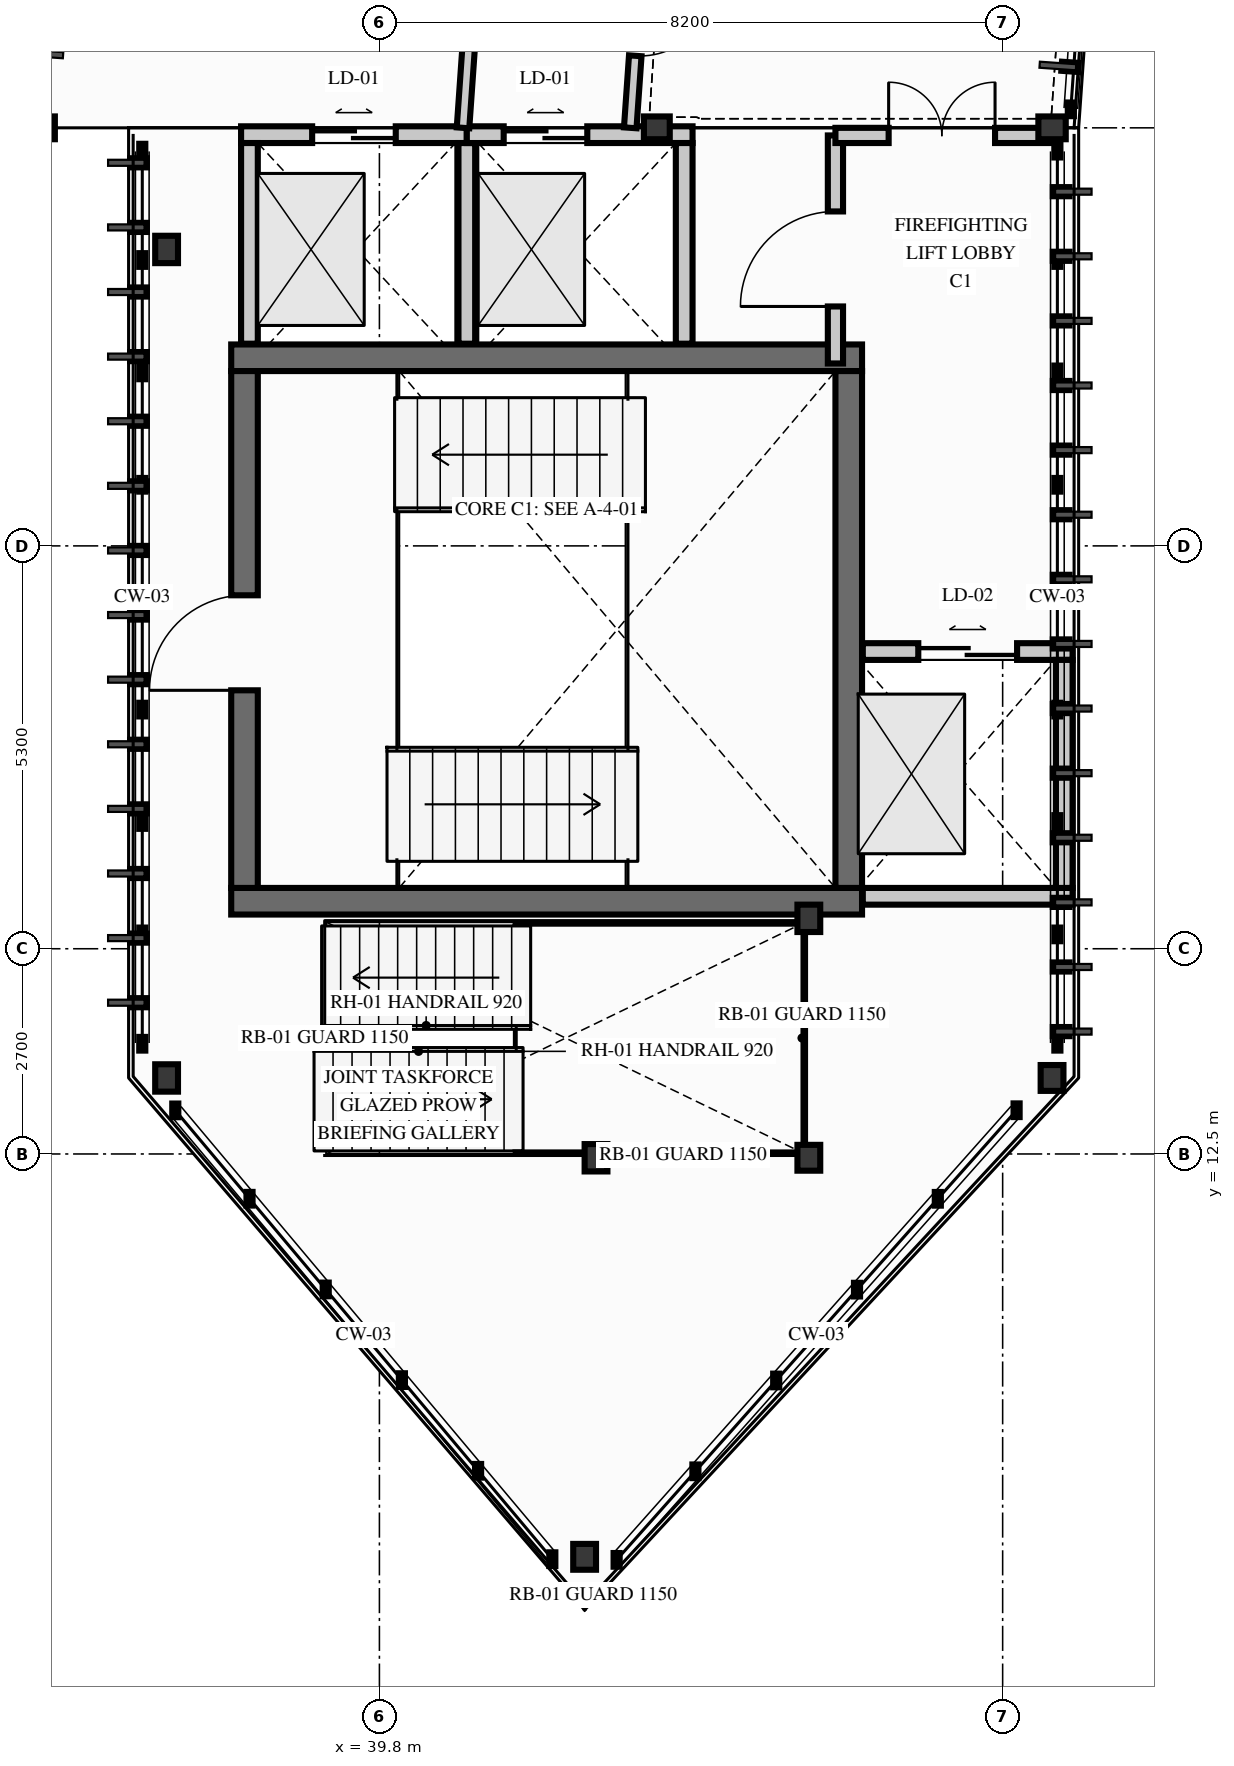
"""IFC4 building model, lengths in metres.
Left out: names, types, materials, properties, quantities, classifications, styles, units other than length and angle.
Written with IfcOpenShell. Run it as: python <this file> out.ifc"""

import sys

from ifc_helpers import new_model, si_unit, direction, frame, frame_2d, origin, origin_2d, place, context, subcontext, project, spatial, rectangle, i_section, extrude, element, fill, save


model = new_model("IFC4")
c1 = context("Model", 3, precision=1e-05, world=origin(), true_north=direction((0.0, 1.0)))
c2 = subcontext(c1, "Body", "Model", "MODEL_VIEW")
j1 = project(units=[si_unit("LENGTHUNIT", "METRE"), si_unit("PLANEANGLEUNIT", "RADIAN")], contexts=[c1])
p1 = place(None, origin())
s1 = spatial("IfcSite", under=j1, at=p1, CompositionType="ELEMENT")
p2 = place(p1, origin())
s2 = spatial("IfcBuilding", under=s1, at=p2, CompositionType="ELEMENT")
p3 = place(p2, frame((0.0, 0.0, 17.7)))
s3 = spatial("IfcBuildingStorey", under=s2, at=p3, CompositionType="ELEMENT", Elevation=17.7)
for number, where, z_axis, x_axis in (
    (1, (37.85, 15.825, 0.0), (0.0, 0.0, 1.0), (1.0, 0.0, 0.0)),
    (2, (37.85, 22.975, 0.0), (0.0, 0.0, 1.0), (1.0, 0.0, 0.0)),
):
    element("IfcWall", number, at=place(p3, frame(where, z_axis=z_axis, x_axis=x_axis)), inside=s3, PredefinedType="SHEAR", context=c2, shape_type="SweptSolid", body=[
        extrude(rectangle(XDim=8.3, YDim=0.35, at=frame_2d((4.15, 0.0))), origin(), (0.0, 0.0, 1.0), 3.7),
    ])
p4 = place(p3, frame((38.025, 16.0, 0.0), z_axis=(0.0, 0.0, 1.0), x_axis=(0.0, 1.0, 0.0)))
e3 = element("IfcWall", 3, at=p4, inside=s3, PredefinedType="SHEAR", context=c2, shape_type="SweptSolid", body=[
    extrude(rectangle(XDim=6.8, YDim=0.35, at=frame_2d((3.4, 0.0))), origin(), (0.0, 0.0, 1.0), 3.7),
])
p5 = place(p4, frame((2.6, 0.0, 0.0)))
e4 = element("IfcOpeningElement", 4, at=p5, cuts=e3, PredefinedType="OPENING", context=c2, shape_type="SweptSolid", body=[
    extrude(rectangle(XDim=1.25, YDim=2.2, at=frame_2d((0.625, 1.1))), frame((0.0, 0.185, 0.0), z_axis=(0.0, -1.0, 0.0), x_axis=(1.0, 0.0, 0.0)), (0.0, 0.0, 1.0), 0.37),
])
p6 = place(p3, frame((45.975, 16.0, 0.0), z_axis=(0.0, 0.0, 1.0), x_axis=(0.0, 1.0, 0.0)))
e5 = element("IfcWall", 5, at=p6, inside=s3, PredefinedType="SHEAR", context=c2, shape_type="SweptSolid", body=[
    extrude(rectangle(XDim=6.8, YDim=0.35, at=frame_2d((3.4, 0.0))), origin(), (0.0, 0.0, 1.0), 3.7),
])
p7 = place(p3, frame((48.65, 26.0, 0.0), z_axis=(0.0, 0.0, 1.0), x_axis=(0.0, 1.0, 0.0)))
e6 = element("IfcColumn", 6, at=p7, inside=s3, PredefinedType="COLUMN", context=c2, shape_type="SweptSolid", body=[
    extrude(i_section(OverallWidth=0.3, OverallDepth=0.36, WebThickness=0.012, FlangeThickness=0.022, FilletRadius=0.027, at=origin_2d()), origin(), (0.0, 0.0, 1.0), 3.9),
])
p8 = place(p3, frame((43.45, 26.0, 0.0), z_axis=(0.0, 0.0, 1.0), x_axis=(0.0, 1.0, 0.0)))
e7 = element("IfcColumn", 7, at=p8, inside=s3, PredefinedType="COLUMN", context=c2, shape_type="SweptSolid", body=[
    extrude(i_section(OverallWidth=0.3, OverallDepth=0.34, WebThickness=0.012, FlangeThickness=0.021, FilletRadius=0.027, at=origin_2d()), origin(), (0.0, 0.0, 1.0), 3.9),
])
for number, where, z_axis, x_axis in (
    (8, (35.35, 26.0, 0.0), (0.0, 0.0, 1.0), (0.0, 1.0, 0.0)),
    (9, (37.0, 24.4, 0.0), (0.0, 0.0, 1.0), (1.0, 0.0, 0.0)),
):
    element("IfcColumn", number, at=place(p3, frame(where, z_axis=z_axis, x_axis=x_axis)), inside=s3, PredefinedType="COLUMN", context=c2, shape_type="SweptSolid", body=[
        extrude(i_section(OverallWidth=0.3, OverallDepth=0.36, WebThickness=0.012, FlangeThickness=0.022, FilletRadius=0.027, at=origin_2d()), origin(), (0.0, 0.0, 1.0), 3.9),
    ])
p9 = place(p3, frame((48.65, 13.5, 0.0), z_axis=(0.0, 0.0, 1.0), x_axis=(1.0, 0.0, 0.0)))
e10 = element("IfcColumn", 10, at=p9, inside=s3, PredefinedType="COLUMN", context=c2, shape_type="SweptSolid", body=[
    extrude(i_section(OverallWidth=0.3, OverallDepth=0.34, WebThickness=0.012, FlangeThickness=0.021, FilletRadius=0.027, at=origin_2d()), origin(), (0.0, 0.0, 1.0), 3.9),
])
p10 = place(p3, frame((37.0, 13.5, 0.0), z_axis=(0.0, 0.0, 1.0), x_axis=(1.0, 0.0, 0.0)))
e11 = element("IfcColumn", 11, at=p10, inside=s3, PredefinedType="COLUMN", context=c2, shape_type="SweptSolid", body=[
    extrude(i_section(OverallWidth=0.3, OverallDepth=0.36, WebThickness=0.012, FlangeThickness=0.022, FilletRadius=0.027, at=origin_2d()), origin(), (0.0, 0.0, 1.0), 3.9),
])
p11 = place(p3, frame((42.5, 7.2, 0.0), z_axis=(0.0, 0.0, 1.0), x_axis=(1.0, 0.0, 0.0)))
e12 = element("IfcColumn", 12, at=p11, inside=s3, PredefinedType="COLUMN", context=c2, shape_type="SweptSolid", body=[
    extrude(i_section(OverallWidth=0.3, OverallDepth=0.34, WebThickness=0.012, FlangeThickness=0.021, FilletRadius=0.027, at=origin_2d()), origin(), (0.0, 0.0, 1.0), 3.9),
])
p12 = place(p3, frame((42.65, 12.45, 0.0), z_axis=(0.0, 0.0, 1.0), x_axis=(1.0, 0.0, 0.0)))
e13 = element("IfcColumn", 13, at=p12, inside=s3, PredefinedType="COLUMN", context=c2, shape_type="SweptSolid", body=[
    extrude(i_section(OverallWidth=0.3, OverallDepth=0.36, WebThickness=0.012, FlangeThickness=0.022, FilletRadius=0.027, at=origin_2d()), origin(), (0.0, 0.0, 1.0), 3.9),
])
p13 = place(p3, frame((45.45, 12.45, 0.0), z_axis=(0.0, 0.0, 1.0), x_axis=(1.0, 0.0, 0.0)))
e14 = element("IfcColumn", 14, at=p13, inside=s3, PredefinedType="COLUMN", context=c2, shape_type="SweptSolid", body=[
    extrude(i_section(OverallWidth=0.3, OverallDepth=0.34, WebThickness=0.012, FlangeThickness=0.021, FilletRadius=0.027, at=origin_2d()), origin(), (0.0, 0.0, 1.0), 3.9),
])
p14 = place(p3, frame((45.45, 15.6, 0.0), z_axis=(0.0, 0.0, 1.0), x_axis=(1.0, 0.0, 0.0)))
e15 = element("IfcColumn", 15, at=p14, inside=s3, PredefinedType="COLUMN", context=c2, shape_type="SweptSolid", body=[
    extrude(i_section(OverallWidth=0.3, OverallDepth=0.36, WebThickness=0.012, FlangeThickness=0.022, FilletRadius=0.027, at=origin_2d()), origin(), (0.0, 0.0, 1.0), 3.9),
])
p15 = place(p3, frame((46.16, 15.89, 0.0), z_axis=(0.0, 0.0, 1.0), x_axis=(1.0, 0.0, 0.0)))
e16 = element("IfcWall", 16, at=p15, inside=s3, PredefinedType="PARTITIONING", context=c2, shape_type="SweptSolid", body=[
    extrude(rectangle(XDim=2.76, YDim=0.22, at=frame_2d((1.38, 0.0))), origin(), (0.0, 0.0, 1.0), 3.338),
])
p16 = place(p3, frame((46.16, 19.11, 0.0), z_axis=(0.0, 0.0, 1.0), x_axis=(1.0, 0.0, 0.0)))
e17 = element("IfcWall", 17, at=p16, inside=s3, PredefinedType="PARTITIONING", context=c2, shape_type="SweptSolid", body=[
    extrude(rectangle(XDim=2.76, YDim=0.22, at=frame_2d((1.38, 0.0))), origin(), (0.0, 0.0, 1.0), 3.338),
])
p17 = place(p16, frame((0.73, 0.0, 0.0)))
e18 = element("IfcOpeningElement", 18, at=p17, cuts=e17, PredefinedType="OPENING", context=c2, shape_type="SweptSolid", body=[
    extrude(rectangle(XDim=1.3, YDim=2.2, at=frame_2d((0.65, 1.1))), frame((0.0, 0.12, 0.0), z_axis=(0.0, -1.0, 0.0), x_axis=(1.0, 0.0, 0.0)), (0.0, 0.0, 1.0), 0.24),
])
p18 = place(p3, frame((48.81, 16.0, 0.0), z_axis=(0.0, 0.0, 1.0), x_axis=(0.0, 1.0, 0.0)))
e19 = element("IfcWall", 19, at=p18, inside=s3, PredefinedType="PARTITIONING", context=c2, shape_type="SweptSolid", body=[
    extrude(rectangle(XDim=3.0, YDim=0.22, at=frame_2d((1.5, 0.0))), origin(), (0.0, 0.0, 1.0), 3.34),
])
p19 = place(p3, frame((37.98, 25.91, 0.0), z_axis=(0.0, 0.0, 1.0), x_axis=(1.0, 0.0, 0.0)))
e20 = element("IfcWall", 20, at=p19, inside=s3, PredefinedType="PARTITIONING", context=c2, shape_type="SweptSolid", body=[
    extrude(rectangle(XDim=2.97, YDim=0.22, at=frame_2d((1.485, 0.0))), origin(), (0.0, 0.0, 1.0), 3.25),
])
p20 = place(p19, frame((0.935, 0.0, 0.0)))
e21 = element("IfcOpeningElement", 21, at=p20, cuts=e20, PredefinedType="OPENING", context=c2, shape_type="SweptSolid", body=[
    extrude(rectangle(XDim=1.1, YDim=2.15, at=frame_2d((0.55, 1.075))), frame((0.0, 0.12, 0.0), z_axis=(0.0, -1.0, 0.0), x_axis=(1.0, 0.0, 0.0)), (0.0, 0.0, 1.0), 0.24),
])
for number, where, z_axis, x_axis in (
    (22, (38.09, 23.16, 0.0), (0.0, 0.0, 1.0), (0.0, 1.0, 0.0)),
    (23, (40.95, 23.16, 0.0), (0.0, 0.0, 1.0), (0.0, 1.0, 0.0)),
):
    element("IfcWall", number, at=place(p3, frame(where, z_axis=z_axis, x_axis=x_axis)), inside=s3, PredefinedType="PARTITIONING", context=c2, shape_type="SweptSolid", body=[
        extrude(rectangle(XDim=2.64, YDim=0.22, at=frame_2d((1.32, 0.0))), origin(), (0.0, 0.0, 1.0), 3.68),
    ])
p21 = place(p3, frame((40.95, 25.91, 0.0), z_axis=(0.0, 0.0, 1.0), x_axis=(1.0, 0.0, 0.0)))
e24 = element("IfcWall", 24, at=p21, inside=s3, PredefinedType="PARTITIONING", context=c2, shape_type="SweptSolid", body=[
    extrude(rectangle(XDim=2.97, YDim=0.22, at=frame_2d((1.485, 0.0))), origin(), (0.0, 0.0, 1.0), 3.25),
])
p22 = place(p21, frame((0.485, 0.0, 0.0)))
e25 = element("IfcOpeningElement", 25, at=p22, cuts=e24, PredefinedType="OPENING", context=c2, shape_type="SweptSolid", body=[
    extrude(rectangle(XDim=1.1, YDim=2.15, at=frame_2d((0.55, 1.075))), frame((0.0, 0.12, 0.0), z_axis=(0.0, -1.0, 0.0), x_axis=(1.0, 0.0, 0.0)), (0.0, 0.0, 1.0), 0.24),
])
p23 = place(p3, frame((43.81, 23.16, 0.0), z_axis=(0.0, 0.0, 1.0), x_axis=(0.0, 1.0, 0.0)))
e26 = element("IfcWall", 26, at=p23, inside=s3, PredefinedType="PARTITIONING", context=c2, shape_type="SweptSolid", body=[
    extrude(rectangle(XDim=2.64, YDim=0.22, at=frame_2d((1.32, 0.0))), origin(), (0.0, 0.0, 1.0), 3.68),
])
p24 = place(p3, frame((45.8, 22.9, 0.0), z_axis=(0.0, 0.0, 1.0), x_axis=(0.0, 1.0, 0.0)))
e27 = element("IfcWall", 27, at=p24, inside=s3, PredefinedType="PARTITIONING", context=c2, shape_type="SweptSolid", body=[
    extrude(rectangle(XDim=3.0, YDim=0.2, at=frame_2d((1.5, 0.0))), origin(), (0.0, 0.0, 1.0), 3.68),
])
p25 = place(p24, frame((0.75, 0.0, 0.0)))
e28 = element("IfcOpeningElement", 28, at=p25, cuts=e27, PredefinedType="OPENING", context=c2, shape_type="SweptSolid", body=[
    extrude(rectangle(XDim=1.25, YDim=2.2, at=frame_2d((0.625, 1.1))), frame((0.0, 0.11, 0.0), z_axis=(0.0, -1.0, 0.0), x_axis=(1.0, 0.0, 0.0)), (0.0, 0.0, 1.0), 0.22),
])
p26 = place(p3, frame((45.8, 25.9, 0.0), z_axis=(0.0, 0.0, 1.0), x_axis=(1.0, 0.0, 0.0)))
e29 = element("IfcWall", 29, at=p26, inside=s3, PredefinedType="PARTITIONING", context=c2, shape_type="SweptSolid", body=[
    extrude(rectangle(XDim=2.85, YDim=0.2, at=frame_2d((1.425, 0.0))), origin(), (0.0, 0.0, 1.0), 3.3),
])
p27 = place(p26, frame((0.7, 0.0, 0.0)))
e30 = element("IfcOpeningElement", 30, at=p27, cuts=e29, PredefinedType="OPENING", context=c2, shape_type="SweptSolid", body=[
    extrude(rectangle(XDim=1.4, YDim=2.25, at=frame_2d((0.7, 1.125))), frame((0.0, 0.11, 0.0), z_axis=(0.0, -1.0, 0.0), x_axis=(1.0, 0.0, 0.0)), (0.0, 0.0, 1.0), 0.22),
])
p28 = place(p3, frame((43.595, 33.084, 0.0), z_axis=(0.0, 0.0, 1.0), x_axis=(-0.069756597752, -0.997564041588, 0.0)))
e31 = element("IfcWall", 31, at=p28, inside=s3, PredefinedType="PARTITIONING", context=c2, shape_type="SweptSolid", body=[
    extrude(rectangle(XDim=7.101, YDim=0.165, at=frame_2d((3.551, 0.0))), origin(), (0.0, 0.0, 1.0), 3.68),
])
p29 = place(p28, frame((5.201, 0.0, 0.0)))
e32 = element("IfcOpeningElement", 32, at=p29, cuts=e31, PredefinedType="OPENING", context=c2, shape_type="SweptSolid", body=[
    extrude(rectangle(XDim=0.95, YDim=2.15, at=frame_2d((0.475, 1.075))), frame((0.0, 0.093, 0.0), z_axis=(0.0, -1.0, 0.0), x_axis=(1.0, 0.0, 0.0)), (0.0, 0.0, 1.0), 0.185),
])
p30 = place(p28, frame((0.75, 0.0, 0.0)))
e33 = element("IfcOpeningElement", 33, at=p30, cuts=e31, PredefinedType="OPENING", context=c2, shape_type="SweptSolid", body=[
    extrude(rectangle(XDim=1.05, YDim=2.2, at=frame_2d((0.525, 1.1))), frame((0.0, 0.093, 0.0), z_axis=(0.0, -1.0, 0.0), x_axis=(1.0, 0.0, 0.0)), (0.0, 0.0, 1.0), 0.185),
])
p31 = place(p3, frame((41.417, 33.39, 0.0), z_axis=(0.0, 0.0, 1.0), x_axis=(-0.069766817412, -0.997563326906, 0.0)))
e34 = element("IfcWall", 34, at=p31, inside=s3, PredefinedType="PARTITIONING", context=c2, shape_type="SweptSolid", body=[
    extrude(rectangle(XDim=7.408, YDim=0.165, at=frame_2d((3.704, 0.0))), origin(), (0.0, 0.0, 1.0), 3.68),
])
p32 = place(p31, frame((3.111, 0.0, 0.0)))
e35 = element("IfcOpeningElement", 35, at=p32, cuts=e34, PredefinedType="OPENING", context=c2, shape_type="SweptSolid", body=[
    extrude(rectangle(XDim=1.76, YDim=2.36, at=frame_2d((0.88, 1.18))), frame((0.0, 0.093, 0.0), z_axis=(0.0, -1.0, 0.0), x_axis=(1.0, 0.0, 0.0)), (0.0, 0.0, 1.0), 0.185),
])
p33 = place(p5, origin())
e36 = element("IfcDoor", 36, at=p33, inside=s3, OperationType="SINGLE_SWING_LEFT", PredefinedType="DOOR", context=c2, shape_type="SweptSolid", body=[
    extrude(rectangle(XDim=1.25, YDim=2.2, at=frame_2d((0.625, 1.1))), frame((0.0, 0.025, 0.0), z_axis=(0.0, -1.0, 0.0), x_axis=(1.0, 0.0, 0.0)), (0.0, 0.0, 1.0), 0.05),
])
fill(e4, e36)
p34 = place(p17, origin())
e37 = element("IfcDoor", 37, at=p34, inside=s3, OperationType="DOUBLE_DOOR_SLIDING", PredefinedType="DOOR", context=c2, shape_type="SweptSolid", body=[
    extrude(rectangle(XDim=1.3, YDim=2.2, at=frame_2d((0.65, 1.1))), frame((0.0, 0.025, 0.0), z_axis=(0.0, -1.0, 0.0), x_axis=(1.0, 0.0, 0.0)), (0.0, 0.0, 1.0), 0.05),
])
fill(e18, e37)
p35 = place(p20, origin())
e38 = element("IfcDoor", 38, at=p35, inside=s3, OperationType="DOUBLE_DOOR_SLIDING", PredefinedType="DOOR", context=c2, shape_type="SweptSolid", body=[
    extrude(rectangle(XDim=1.1, YDim=2.15, at=frame_2d((0.55, 1.075))), frame((0.0, 0.025, 0.0), z_axis=(0.0, -1.0, 0.0), x_axis=(1.0, 0.0, 0.0)), (0.0, 0.0, 1.0), 0.05),
])
fill(e21, e38)
p36 = place(p22, origin())
e39 = element("IfcDoor", 39, at=p36, inside=s3, OperationType="DOUBLE_DOOR_SLIDING", PredefinedType="DOOR", context=c2, shape_type="SweptSolid", body=[
    extrude(rectangle(XDim=1.1, YDim=2.15, at=frame_2d((0.55, 1.075))), frame((0.0, 0.025, 0.0), z_axis=(0.0, -1.0, 0.0), x_axis=(1.0, 0.0, 0.0)), (0.0, 0.0, 1.0), 0.05),
])
fill(e25, e39)
p37 = place(p27, origin())
e40 = element("IfcDoor", 40, at=p37, inside=s3, OperationType="DOUBLE_DOOR_SINGLE_SWING", PredefinedType="DOOR", context=c2, shape_type="SweptSolid", body=[
    extrude(rectangle(XDim=1.4, YDim=2.25, at=frame_2d((0.7, 1.125))), frame((0.0, 0.025, 0.0), z_axis=(0.0, -1.0, 0.0), x_axis=(1.0, 0.0, 0.0)), (0.0, 0.0, 1.0), 0.05),
])
fill(e30, e40)
p38 = place(p25, origin())
e41 = element("IfcDoor", 41, at=p38, inside=s3, OperationType="SINGLE_SWING_LEFT", PredefinedType="DOOR", context=c2, shape_type="SweptSolid", body=[
    extrude(rectangle(XDim=1.25, YDim=2.2, at=frame_2d((0.625, 1.1))), frame((0.0, 0.025, 0.0), z_axis=(0.0, -1.0, 0.0), x_axis=(1.0, 0.0, 0.0)), (0.0, 0.0, 1.0), 0.05),
])
fill(e28, e41)
p39 = place(p29, origin())
e42 = element("IfcDoor", 42, at=p39, inside=s3, OperationType="SINGLE_SWING_LEFT", PredefinedType="DOOR", context=c2, shape_type="SweptSolid", body=[
    extrude(rectangle(XDim=0.95, YDim=2.15, at=frame_2d((0.475, 1.075))), frame((0.0, 0.025, 0.0), z_axis=(0.0, -1.0, 0.0), x_axis=(1.0, 0.0, 0.0)), (0.0, 0.0, 1.0), 0.05),
])
fill(e32, e42)
save(model, sys.argv[1])
